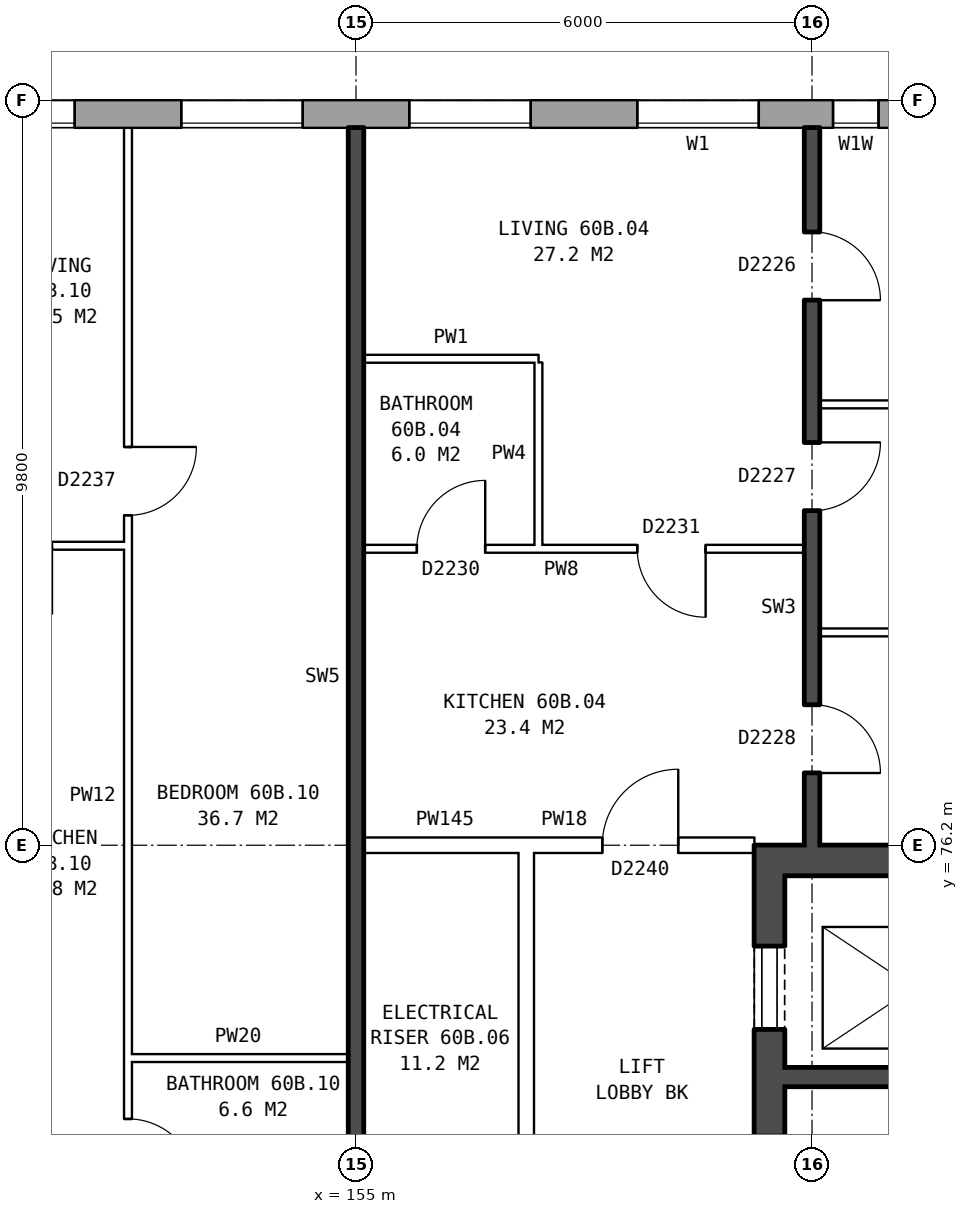
"""IFC4 building model, lengths in metres.
Left out: names, types, materials, properties, quantities, classifications, styles, units other than length and angle.
Written with IfcOpenShell. Run it as: python <this file> out.ifc"""

import sys

from ifc_helpers import new_model, si_unit, direction, frame, frame_2d, origin, place, context, subcontext, project, spatial, rectangle, extrude, element, fill, save


model = new_model("IFC4")
c1 = context("Model", 3, precision=1e-05, world=origin(), true_north=direction((0.0, 1.0)))
c2 = subcontext(c1, "Body", "Model", "MODEL_VIEW")
j1 = project(units=[si_unit("LENGTHUNIT", "METRE"), si_unit("PLANEANGLEUNIT", "RADIAN")], contexts=[c1])
p1 = place(None, origin())
s1 = spatial("IfcSite", under=j1, at=p1, CompositionType="ELEMENT")
p2 = place(p1, origin())
s2 = spatial("IfcBuilding", under=s1, at=p2, CompositionType="ELEMENT")
p3 = place(p2, frame((0.0, 0.0, 212.1)))
s3 = spatial("IfcBuildingStorey", under=s2, at=p3, CompositionType="ELEMENT", Elevation=212.1)
p4 = place(p3, frame((165.925, 85.82, 0.0), z_axis=(0.0, 0.0, 1.0), x_axis=(-1.0, 0.0, 0.0)))
e1 = element("IfcWall", 1, at=p4, inside=s3, PredefinedType="STANDARD", context=c2, shape_type="SweptSolid", body=[
    extrude(rectangle(XDim=33.875, YDim=0.36, at=frame_2d((16.938, 0.0))), origin(), (0.0, 0.0, 1.0), 2.85),
])
p5 = place(p4, frame((0.3, 0.0, 0.8)))
e2 = element("IfcOpeningElement", 2, at=p5, cuts=e1, PredefinedType="OPENING", context=c2, shape_type="SweptSolid", body=[
    extrude(rectangle(XDim=0.6, YDim=1.8, at=frame_2d((0.3, 0.9))), frame((0.0, 0.19, 0.0), z_axis=(0.0, -1.0, 0.0), x_axis=(1.0, 0.0, 0.0)), (0.0, 0.0, 1.0), 0.38),
])
p6 = place(p4, frame((5.625, 0.0, 0.8)))
e3 = element("IfcOpeningElement", 3, at=p6, cuts=e1, PredefinedType="OPENING", context=c2, shape_type="SweptSolid", body=[
    extrude(rectangle(XDim=1.6, YDim=1.8, at=frame_2d((0.8, 0.9))), frame((0.0, 0.19, 0.0), z_axis=(0.0, -1.0, 0.0), x_axis=(1.0, 0.0, 0.0)), (0.0, 0.0, 1.0), 0.38),
])
p7 = place(p4, frame((8.625, 0.0, 0.8)))
e4 = element("IfcOpeningElement", 4, at=p7, cuts=e1, PredefinedType="OPENING", context=c2, shape_type="SweptSolid", body=[
    extrude(rectangle(XDim=1.6, YDim=1.8, at=frame_2d((0.8, 0.9))), frame((0.0, 0.19, 0.0), z_axis=(0.0, -1.0, 0.0), x_axis=(1.0, 0.0, 0.0)), (0.0, 0.0, 1.0), 0.38),
])
p8 = place(p4, frame((11.625, 0.0, 0.8)))
e5 = element("IfcOpeningElement", 5, at=p8, cuts=e1, PredefinedType="OPENING", context=c2, shape_type="SweptSolid", body=[
    extrude(rectangle(XDim=1.6, YDim=1.8, at=frame_2d((0.8, 0.9))), frame((0.0, 0.19, 0.0), z_axis=(0.0, -1.0, 0.0), x_axis=(1.0, 0.0, 0.0)), (0.0, 0.0, 1.0), 0.38),
])
p9 = place(p4, frame((14.625, 0.0, 0.8)))
e6 = element("IfcOpeningElement", 6, at=p9, cuts=e1, PredefinedType="OPENING", context=c2, shape_type="SweptSolid", body=[
    extrude(rectangle(XDim=1.6, YDim=1.8, at=frame_2d((0.8, 0.9))), frame((0.0, 0.19, 0.0), z_axis=(0.0, -1.0, 0.0), x_axis=(1.0, 0.0, 0.0)), (0.0, 0.0, 1.0), 0.38),
])
p10 = place(p4, frame((17.625, 0.0, 0.8)))
e7 = element("IfcOpeningElement", 7, at=p10, cuts=e1, PredefinedType="OPENING", context=c2, shape_type="SweptSolid", body=[
    extrude(rectangle(XDim=1.6, YDim=1.8, at=frame_2d((0.8, 0.9))), frame((0.0, 0.19, 0.0), z_axis=(0.0, -1.0, 0.0), x_axis=(1.0, 0.0, 0.0)), (0.0, 0.0, 1.0), 0.38),
])
p11 = place(p4, frame((20.625, 0.0, 0.8)))
e8 = element("IfcOpeningElement", 8, at=p11, cuts=e1, PredefinedType="OPENING", context=c2, shape_type="SweptSolid", body=[
    extrude(rectangle(XDim=1.6, YDim=1.8, at=frame_2d((0.8, 0.9))), frame((0.0, 0.19, 0.0), z_axis=(0.0, -1.0, 0.0), x_axis=(1.0, 0.0, 0.0)), (0.0, 0.0, 1.0), 0.38),
])
p12 = place(p4, frame((23.625, 0.0, 0.8)))
e9 = element("IfcOpeningElement", 9, at=p12, cuts=e1, PredefinedType="OPENING", context=c2, shape_type="SweptSolid", body=[
    extrude(rectangle(XDim=1.6, YDim=1.8, at=frame_2d((0.8, 0.9))), frame((0.0, 0.19, 0.0), z_axis=(0.0, -1.0, 0.0), x_axis=(1.0, 0.0, 0.0)), (0.0, 0.0, 1.0), 0.38),
])
p13 = place(p4, frame((25.525, 0.0, 0.8)))
e10 = element("IfcOpeningElement", 10, at=p13, cuts=e1, PredefinedType="OPENING", context=c2, shape_type="SweptSolid", body=[
    extrude(rectangle(XDim=1.6, YDim=1.8, at=frame_2d((0.8, 0.9))), frame((0.0, 0.19, 0.0), z_axis=(0.0, -1.0, 0.0), x_axis=(1.0, 0.0, 0.0)), (0.0, 0.0, 1.0), 0.38),
])
p14 = place(p4, frame((29.625, 0.0, 0.8)))
e11 = element("IfcOpeningElement", 11, at=p14, cuts=e1, PredefinedType="OPENING", context=c2, shape_type="SweptSolid", body=[
    extrude(rectangle(XDim=1.6, YDim=1.8, at=frame_2d((0.8, 0.9))), frame((0.0, 0.19, 0.0), z_axis=(0.0, -1.0, 0.0), x_axis=(1.0, 0.0, 0.0)), (0.0, 0.0, 1.0), 0.38),
])
p15 = place(p4, frame((1.2, 0.0, 1.1)))
e12 = element("IfcOpeningElement", 12, at=p15, cuts=e1, PredefinedType="OPENING", context=c2, shape_type="SweptSolid", body=[
    extrude(rectangle(XDim=1.4, YDim=1.5, at=frame_2d((0.7, 0.75))), frame((0.0, 0.19, 0.0), z_axis=(0.0, -1.0, 0.0), x_axis=(1.0, 0.0, 0.0)), (0.0, 0.0, 1.0), 0.38),
])
p16 = place(p4, frame((4.05, 0.0, 0.8)))
e13 = element("IfcOpeningElement", 13, at=p16, cuts=e1, PredefinedType="OPENING", context=c2, shape_type="SweptSolid", body=[
    extrude(rectangle(XDim=0.6, YDim=0.9, at=frame_2d((0.3, 0.45))), frame((0.0, 0.19, 0.0), z_axis=(0.0, -1.0, 0.0), x_axis=(1.0, 0.0, 0.0)), (0.0, 0.0, 1.0), 0.38),
])
p17 = place(p3, frame((160.44, 76.2, 0.0), z_axis=(0.0, 0.0, 1.0), x_axis=(0.0, -1.0, 0.0)))
e14 = element("IfcWall", 14, at=p17, inside=s3, PredefinedType="SHEAR", context=c2, shape_type="SweptSolid", body=[
    extrude(rectangle(XDim=12.4, YDim=0.4, at=frame_2d((6.2, 0.0))), origin(), (0.0, 0.0, 1.0), 2.85),
])
p18 = place(p17, frame((1.325, 0.0, 0.0)))
e15 = element("IfcOpeningElement", 15, at=p18, cuts=e14, PredefinedType="OPENING", context=c2, shape_type="SweptSolid", body=[
    extrude(rectangle(XDim=1.1, YDim=2.1, at=frame_2d((0.55, 1.05))), frame((0.0, 0.21, 0.0), z_axis=(0.0, -1.0, 0.0), x_axis=(1.0, 0.0, 0.0)), (0.0, 0.0, 1.0), 0.42),
])
p19 = place(p17, frame((3.825, 0.0, 0.0)))
e16 = element("IfcOpeningElement", 16, at=p19, cuts=e14, PredefinedType="OPENING", context=c2, shape_type="SweptSolid", body=[
    extrude(rectangle(XDim=0.85, YDim=2.1, at=frame_2d((0.425, 1.05))), frame((0.0, 0.21, 0.0), z_axis=(0.0, -1.0, 0.0), x_axis=(1.0, 0.0, 0.0)), (0.0, 0.0, 1.0), 0.42),
])
p20 = place(p17, frame((5.975, 0.0, 0.0)))
e17 = element("IfcOpeningElement", 17, at=p20, cuts=e14, PredefinedType="OPENING", context=c2, shape_type="SweptSolid", body=[
    extrude(rectangle(XDim=0.85, YDim=2.1, at=frame_2d((0.425, 1.05))), frame((0.0, 0.21, 0.0), z_axis=(0.0, -1.0, 0.0), x_axis=(1.0, 0.0, 0.0)), (0.0, 0.0, 1.0), 0.42),
])
p21 = place(p17, frame((9.9, 0.0, 0.0)))
e18 = element("IfcOpeningElement", 18, at=p21, cuts=e14, PredefinedType="OPENING", context=c2, shape_type="SweptSolid", body=[
    extrude(rectangle(XDim=1.1, YDim=2.1, at=frame_2d((0.55, 1.05))), frame((0.0, 0.21, 0.0), z_axis=(0.0, -1.0, 0.0), x_axis=(1.0, 0.0, 0.0)), (0.0, 0.0, 1.0), 0.42),
])
p22 = place(p17, frame((8.125, 0.0, 0.0)))
e19 = element("IfcOpeningElement", 19, at=p22, cuts=e14, PredefinedType="OPENING", context=c2, shape_type="SweptSolid", body=[
    extrude(rectangle(XDim=0.85, YDim=2.1, at=frame_2d((0.425, 1.05))), frame((0.0, 0.21, 0.0), z_axis=(0.0, -1.0, 0.0), x_axis=(1.0, 0.0, 0.0)), (0.0, 0.0, 1.0), 0.42),
])
p23 = place(p3, frame((160.64, 76.0, 0.0), z_axis=(0.0, 0.0, 1.0), x_axis=(1.0, 0.0, 0.0)))
e20 = element("IfcWall", 20, at=p23, inside=s3, PredefinedType="SHEAR", context=c2, shape_type="SweptSolid", body=[
    extrude(rectangle(XDim=7.6, YDim=0.4, at=frame_2d((3.8, 0.0))), origin(), (0.0, 0.0, 1.0), 2.85),
])
p24 = place(p3, frame((160.64, 73.15, 0.0), z_axis=(0.0, 0.0, 1.0), x_axis=(1.0, 0.0, 0.0)))
e21 = element("IfcWall", 21, at=p24, inside=s3, PredefinedType="SHEAR", context=c2, shape_type="SweptSolid", body=[
    extrude(rectangle(XDim=4.775, YDim=0.25, at=frame_2d((2.388, 0.0))), origin(), (0.0, 0.0, 1.0), 2.85),
])
p25 = place(p3, frame((157.24, 63.9, 0.0), z_axis=(0.0, 0.0, 1.0), x_axis=(0.0, 1.0, 0.0)))
e22 = element("IfcWall", 22, at=p25, inside=s3, PredefinedType="PARTITIONING", context=c2, shape_type="SweptSolid", body=[
    extrude(rectangle(XDim=12.2, YDim=0.2, at=frame_2d((6.1, 0.0))), origin(), (0.0, 0.0, 1.0), 2.85),
])
p26 = place(p25, frame((5.1, 0.0, 0.0)))
e23 = element("IfcOpeningElement", 23, at=p26, cuts=e22, PredefinedType="OPENING", context=c2, shape_type="SweptSolid", body=[
    extrude(rectangle(XDim=2.0, YDim=2.1, at=frame_2d((1.0, 1.05))), frame((0.0, 0.11, 0.0), z_axis=(0.0, -1.0, 0.0), x_axis=(1.0, 0.0, 0.0)), (0.0, 0.0, 1.0), 0.22),
])
p27 = place(p3, frame((152.0, 73.4, 0.0), z_axis=(0.0, 0.0, 1.0), x_axis=(1.0, 0.0, 0.0)))
e24 = element("IfcWall", 24, at=p27, inside=s3, PredefinedType="PARTITIONING", context=c2, shape_type="SweptSolid", body=[
    extrude(rectangle(XDim=2.9, YDim=0.1, at=frame_2d((1.45, 0.0))), origin(), (0.0, 0.0, 1.0), 2.85),
])
p28 = place(p3, frame((155.1, 76.2, 0.0), z_axis=(0.0, 0.0, 1.0), x_axis=(1.0, 0.0, 0.0)))
e25 = element("IfcWall", 25, at=p28, inside=s3, PredefinedType="PARTITIONING", context=c2, shape_type="SweptSolid", body=[
    extrude(rectangle(XDim=2.14, YDim=0.2, at=frame_2d((1.07, 0.0))), origin(), (0.0, 0.0, 1.0), 2.85),
])
p29 = place(p3, frame((157.24, 76.2, 0.0), z_axis=(0.0, 0.0, 1.0), x_axis=(1.0, 0.0, 0.0)))
e26 = element("IfcWall", 26, at=p29, inside=s3, PredefinedType="PARTITIONING", context=c2, shape_type="SweptSolid", body=[
    extrude(rectangle(XDim=3.0, YDim=0.2, at=frame_2d((1.5, 0.0))), origin(), (0.0, 0.0, 1.0), 2.85),
])
p30 = place(p29, frame((1.0, 0.0, 0.0)))
e27 = element("IfcOpeningElement", 27, at=p30, cuts=e26, PredefinedType="OPENING", context=c2, shape_type="SweptSolid", body=[
    extrude(rectangle(XDim=1.0, YDim=2.1, at=frame_2d((0.5, 1.05))), frame((0.0, 0.11, 0.0), z_axis=(0.0, -1.0, 0.0), x_axis=(1.0, 0.0, 0.0)), (0.0, 0.0, 1.0), 0.22),
])
p31 = place(p3, frame((161.1, 79.0, 0.0), z_axis=(0.0, 0.0, 1.0), x_axis=(1.0, 0.0, 0.0)))
e28 = element("IfcWall", 28, at=p31, inside=s3, PredefinedType="PARTITIONING", context=c2, shape_type="SweptSolid", body=[
    extrude(rectangle(XDim=7.54, YDim=0.1, at=frame_2d((3.77, 0.0))), origin(), (0.0, 0.0, 1.0), 2.85),
])
p32 = place(p3, frame((155.1, 80.1, 0.0), z_axis=(0.0, 0.0, 1.0), x_axis=(1.0, 0.0, 0.0)))
e29 = element("IfcWall", 29, at=p32, inside=s3, PredefinedType="PARTITIONING", context=c2, shape_type="SweptSolid", body=[
    extrude(rectangle(XDim=5.8, YDim=0.1, at=frame_2d((2.9, 0.0))), origin(), (0.0, 0.0, 1.0), 2.85),
])
p33 = place(p32, frame((3.6, 0.0, 0.0)))
e30 = element("IfcOpeningElement", 30, at=p33, cuts=e29, PredefinedType="OPENING", context=c2, shape_type="SweptSolid", body=[
    extrude(rectangle(XDim=0.9, YDim=2.1, at=frame_2d((0.45, 1.05))), frame((0.0, 0.06, 0.0), z_axis=(0.0, -1.0, 0.0), x_axis=(1.0, 0.0, 0.0)), (0.0, 0.0, 1.0), 0.12),
])
p34 = place(p32, frame((0.7, 0.0, 0.0)))
e31 = element("IfcOpeningElement", 31, at=p34, cuts=e29, PredefinedType="OPENING", context=c2, shape_type="SweptSolid", body=[
    extrude(rectangle(XDim=0.9, YDim=2.1, at=frame_2d((0.45, 1.05))), frame((0.0, 0.06, 0.0), z_axis=(0.0, -1.0, 0.0), x_axis=(1.0, 0.0, 0.0)), (0.0, 0.0, 1.0), 0.12),
])
p35 = place(p3, frame((149.1, 80.14, 0.0), z_axis=(0.0, 0.0, 1.0), x_axis=(1.0, 0.0, 0.0)))
e32 = element("IfcWall", 32, at=p35, inside=s3, PredefinedType="PARTITIONING", context=c2, shape_type="SweptSolid", body=[
    extrude(rectangle(XDim=2.9, YDim=0.1, at=frame_2d((1.45, 0.0))), origin(), (0.0, 0.0, 1.0), 2.85),
])
p36 = place(p35, frame((1.0, 0.0, 0.0)))
e33 = element("IfcOpeningElement", 33, at=p36, cuts=e32, PredefinedType="OPENING", context=c2, shape_type="SweptSolid", body=[
    extrude(rectangle(XDim=0.9, YDim=2.1, at=frame_2d((0.45, 1.05))), frame((0.0, 0.06, 0.0), z_axis=(0.0, -1.0, 0.0), x_axis=(1.0, 0.0, 0.0)), (0.0, 0.0, 1.0), 0.12),
])
p37 = place(p3, frame((161.1, 82.0, 0.0), z_axis=(0.0, 0.0, 1.0), x_axis=(1.0, 0.0, 0.0)))
e34 = element("IfcWall", 34, at=p37, inside=s3, PredefinedType="PARTITIONING", context=c2, shape_type="SweptSolid", body=[
    extrude(rectangle(XDim=7.54, YDim=0.1, at=frame_2d((3.77, 0.0))), origin(), (0.0, 0.0, 1.0), 2.85),
])
p38 = place(p3, frame((155.1, 82.6, 0.0), z_axis=(0.0, 0.0, 1.0), x_axis=(1.0, 0.0, 0.0)))
e35 = element("IfcWall", 35, at=p38, inside=s3, PredefinedType="PARTITIONING", context=c2, shape_type="SweptSolid", body=[
    extrude(rectangle(XDim=2.3, YDim=0.1, at=frame_2d((1.15, 0.0))), origin(), (0.0, 0.0, 1.0), 2.85),
])
p39 = place(p3, frame((152.0, 71.3, 0.0), z_axis=(0.0, 0.0, 1.0), x_axis=(0.0, 1.0, 0.0)))
e36 = element("IfcWall", 36, at=p39, inside=s3, PredefinedType="PARTITIONING", context=c2, shape_type="SweptSolid", body=[
    extrude(rectangle(XDim=14.34, YDim=0.1, at=frame_2d((7.17, 0.0))), origin(), (0.0, 0.0, 1.0), 2.85),
])
p40 = place(p39, frame((9.24, 0.0, 0.0)))
e37 = element("IfcOpeningElement", 37, at=p40, cuts=e36, PredefinedType="OPENING", context=c2, shape_type="SweptSolid", body=[
    extrude(rectangle(XDim=0.9, YDim=2.1, at=frame_2d((0.45, 1.05))), frame((0.0, 0.06, 0.0), z_axis=(0.0, -1.0, 0.0), x_axis=(1.0, 0.0, 0.0)), (0.0, 0.0, 1.0), 0.12),
])
p41 = place(p39, frame((0.4, 0.0, 0.0)))
e38 = element("IfcOpeningElement", 38, at=p41, cuts=e36, PredefinedType="OPENING", context=c2, shape_type="SweptSolid", body=[
    extrude(rectangle(XDim=0.9, YDim=2.1, at=frame_2d((0.45, 1.05))), frame((0.0, 0.06, 0.0), z_axis=(0.0, -1.0, 0.0), x_axis=(1.0, 0.0, 0.0)), (0.0, 0.0, 1.0), 0.12),
])
p42 = place(p3, frame((155.0, 71.2, 0.0), z_axis=(0.0, 0.0, 1.0), x_axis=(0.0, 1.0, 0.0)))
e39 = element("IfcWall", 39, at=p42, inside=s3, PredefinedType="SOLIDWALL", context=c2, shape_type="SweptSolid", body=[
    extrude(rectangle(XDim=14.44, YDim=0.2, at=frame_2d((7.22, 0.0))), origin(), (0.0, 0.0, 1.0), 2.85),
])
p43 = place(p3, frame((157.4, 80.15, 0.0), z_axis=(0.0, 0.0, 1.0), x_axis=(0.0, 1.0, 0.0)))
e40 = element("IfcWall", 40, at=p43, inside=s3, PredefinedType="PARTITIONING", context=c2, shape_type="SweptSolid", body=[
    extrude(rectangle(XDim=2.4, YDim=0.1, at=frame_2d((1.2, 0.0))), origin(), (0.0, 0.0, 1.0), 2.85),
])
p44 = place(p3, frame((161.0, 76.2, 0.0), z_axis=(0.0, 0.0, 1.0), x_axis=(0.0, 1.0, 0.0)))
e41 = element("IfcWall", 41, at=p44, inside=s3, PredefinedType="SOLIDWALL", context=c2, shape_type="SweptSolid", body=[
    extrude(rectangle(XDim=9.44, YDim=0.2, at=frame_2d((4.72, 0.0))), origin(), (0.0, 0.0, 1.0), 2.85),
])
p45 = place(p44, frame((7.17, 0.0, 0.0)))
e42 = element("IfcOpeningElement", 42, at=p45, cuts=e41, PredefinedType="OPENING", context=c2, shape_type="SweptSolid", body=[
    extrude(rectangle(XDim=0.9, YDim=2.1, at=frame_2d((0.45, 1.05))), frame((0.0, 0.11, 0.0), z_axis=(0.0, -1.0, 0.0), x_axis=(1.0, 0.0, 0.0)), (0.0, 0.0, 1.0), 0.22),
])
p46 = place(p44, frame((4.4, 0.0, 0.0)))
e43 = element("IfcOpeningElement", 43, at=p46, cuts=e41, PredefinedType="OPENING", context=c2, shape_type="SweptSolid", body=[
    extrude(rectangle(XDim=0.9, YDim=2.1, at=frame_2d((0.45, 1.05))), frame((0.0, 0.11, 0.0), z_axis=(0.0, -1.0, 0.0), x_axis=(1.0, 0.0, 0.0)), (0.0, 0.0, 1.0), 0.22),
])
p47 = place(p44, frame((0.95, 0.0, 0.0)))
e44 = element("IfcOpeningElement", 44, at=p47, cuts=e41, PredefinedType="OPENING", context=c2, shape_type="SweptSolid", body=[
    extrude(rectangle(XDim=0.9, YDim=2.1, at=frame_2d((0.45, 1.05))), frame((0.0, 0.11, 0.0), z_axis=(0.0, -1.0, 0.0), x_axis=(1.0, 0.0, 0.0)), (0.0, 0.0, 1.0), 0.22),
])
p48 = place(p6, origin())
e45 = element("IfcWindow", 45, at=p48, inside=s3, PartitioningType="SINGLE_PANEL", PredefinedType="WINDOW", context=c2, shape_type="SweptSolid", body=[
    extrude(rectangle(XDim=1.6, YDim=1.8, at=frame_2d((0.8, 0.9))), frame((0.0, 0.15, 0.0), z_axis=(0.0, -1.0, 0.0), x_axis=(1.0, 0.0, 0.0)), (0.0, 0.0, 1.0), 0.06),
])
fill(e3, e45)
p49 = place(p7, origin())
e46 = element("IfcWindow", 46, at=p49, inside=s3, PartitioningType="SINGLE_PANEL", PredefinedType="WINDOW", context=c2, shape_type="SweptSolid", body=[
    extrude(rectangle(XDim=1.6, YDim=1.8, at=frame_2d((0.8, 0.9))), frame((0.0, 0.15, 0.0), z_axis=(0.0, -1.0, 0.0), x_axis=(1.0, 0.0, 0.0)), (0.0, 0.0, 1.0), 0.06),
])
fill(e4, e46)
p50 = place(p8, origin())
e47 = element("IfcWindow", 47, at=p50, inside=s3, PartitioningType="SINGLE_PANEL", PredefinedType="WINDOW", context=c2, shape_type="SweptSolid", body=[
    extrude(rectangle(XDim=1.6, YDim=1.8, at=frame_2d((0.8, 0.9))), frame((0.0, 0.15, 0.0), z_axis=(0.0, -1.0, 0.0), x_axis=(1.0, 0.0, 0.0)), (0.0, 0.0, 1.0), 0.06),
])
fill(e5, e47)
p51 = place(p9, origin())
e48 = element("IfcWindow", 48, at=p51, inside=s3, PartitioningType="SINGLE_PANEL", PredefinedType="WINDOW", context=c2, shape_type="SweptSolid", body=[
    extrude(rectangle(XDim=1.6, YDim=1.8, at=frame_2d((0.8, 0.9))), frame((0.0, 0.15, 0.0), z_axis=(0.0, -1.0, 0.0), x_axis=(1.0, 0.0, 0.0)), (0.0, 0.0, 1.0), 0.06),
])
fill(e6, e48)
p52 = place(p18, origin())
e49 = element("IfcDoor", 49, at=p52, inside=s3, OperationType="DOUBLE_DOOR_SLIDING", PredefinedType="DOOR", context=c2, shape_type="SweptSolid", body=[
    extrude(rectangle(XDim=1.1, YDim=2.1, at=frame_2d((0.55, 1.05))), frame((0.0, 0.185, 0.0), z_axis=(0.0, -1.0, 0.0), x_axis=(1.0, 0.0, 0.0)), (0.0, 0.0, 1.0), 0.05),
])
fill(e15, e49)
p53 = place(p45, frame((0.9, 0.0, 0.0), z_axis=(0.0, 0.0, 1.0), x_axis=(-1.0, 0.0, 0.0)))
e50 = element("IfcDoor", 50, at=p53, inside=s3, OperationType="SINGLE_SWING_RIGHT", PredefinedType="DOOR", context=c2, shape_type="SweptSolid", body=[
    extrude(rectangle(XDim=0.9, YDim=2.1, at=frame_2d((0.45, 1.05))), frame((0.0, 0.025, 0.0), z_axis=(0.0, -1.0, 0.0), x_axis=(1.0, 0.0, 0.0)), (0.0, 0.0, 1.0), 0.05),
])
fill(e42, e50)
p54 = place(p46, frame((0.9, 0.0, 0.0), z_axis=(0.0, 0.0, 1.0), x_axis=(-1.0, 0.0, 0.0)))
e51 = element("IfcDoor", 51, at=p54, inside=s3, OperationType="SINGLE_SWING_LEFT", PredefinedType="DOOR", context=c2, shape_type="SweptSolid", body=[
    extrude(rectangle(XDim=0.9, YDim=2.1, at=frame_2d((0.45, 1.05))), frame((0.0, 0.025, 0.0), z_axis=(0.0, -1.0, 0.0), x_axis=(1.0, 0.0, 0.0)), (0.0, 0.0, 1.0), 0.05),
])
fill(e43, e51)
p55 = place(p47, frame((0.9, 0.0, 0.0), z_axis=(0.0, 0.0, 1.0), x_axis=(-1.0, 0.0, 0.0)))
e52 = element("IfcDoor", 52, at=p55, inside=s3, OperationType="SINGLE_SWING_RIGHT", PredefinedType="DOOR", context=c2, shape_type="SweptSolid", body=[
    extrude(rectangle(XDim=0.9, YDim=2.1, at=frame_2d((0.45, 1.05))), frame((0.0, 0.025, 0.0), z_axis=(0.0, -1.0, 0.0), x_axis=(1.0, 0.0, 0.0)), (0.0, 0.0, 1.0), 0.05),
])
fill(e44, e52)
p56 = place(p30, origin())
e53 = element("IfcDoor", 53, at=p56, inside=s3, OperationType="SINGLE_SWING_RIGHT", PredefinedType="DOOR", context=c2, shape_type="SweptSolid", body=[
    extrude(rectangle(XDim=1.0, YDim=2.1, at=frame_2d((0.5, 1.05))), frame((0.0, 0.025, 0.0), z_axis=(0.0, -1.0, 0.0), x_axis=(1.0, 0.0, 0.0)), (0.0, 0.0, 1.0), 0.05),
])
fill(e27, e53)
p57 = place(p33, frame((0.9, 0.0, 0.0), z_axis=(0.0, 0.0, 1.0), x_axis=(-1.0, 0.0, 0.0)))
e54 = element("IfcDoor", 54, at=p57, inside=s3, OperationType="SINGLE_SWING_LEFT", PredefinedType="DOOR", context=c2, shape_type="SweptSolid", body=[
    extrude(rectangle(XDim=0.9, YDim=2.1, at=frame_2d((0.45, 1.05))), frame((0.0, 0.025, 0.0), z_axis=(0.0, -1.0, 0.0), x_axis=(1.0, 0.0, 0.0)), (0.0, 0.0, 1.0), 0.05),
])
fill(e30, e54)
p58 = place(p34, origin())
e55 = element("IfcDoor", 55, at=p58, inside=s3, OperationType="SINGLE_SWING_RIGHT", PredefinedType="DOOR", context=c2, shape_type="SweptSolid", body=[
    extrude(rectangle(XDim=0.9, YDim=2.1, at=frame_2d((0.45, 1.05))), frame((0.0, 0.025, 0.0), z_axis=(0.0, -1.0, 0.0), x_axis=(1.0, 0.0, 0.0)), (0.0, 0.0, 1.0), 0.05),
])
fill(e31, e55)
p59 = place(p40, frame((0.9, 0.0, 0.0), z_axis=(0.0, 0.0, 1.0), x_axis=(-1.0, 0.0, 0.0)))
e56 = element("IfcDoor", 56, at=p59, inside=s3, OperationType="SINGLE_SWING_LEFT", PredefinedType="DOOR", context=c2, shape_type="SweptSolid", body=[
    extrude(rectangle(XDim=0.9, YDim=2.1, at=frame_2d((0.45, 1.05))), frame((0.0, 0.025, 0.0), z_axis=(0.0, -1.0, 0.0), x_axis=(1.0, 0.0, 0.0)), (0.0, 0.0, 1.0), 0.05),
])
fill(e37, e56)
p60 = place(p41, frame((0.9, 0.0, 0.0), z_axis=(0.0, 0.0, 1.0), x_axis=(-1.0, 0.0, 0.0)))
e57 = element("IfcDoor", 57, at=p60, inside=s3, OperationType="SINGLE_SWING_RIGHT", PredefinedType="DOOR", context=c2, shape_type="SweptSolid", body=[
    extrude(rectangle(XDim=0.9, YDim=2.1, at=frame_2d((0.45, 1.05))), frame((0.0, 0.025, 0.0), z_axis=(0.0, -1.0, 0.0), x_axis=(1.0, 0.0, 0.0)), (0.0, 0.0, 1.0), 0.05),
])
fill(e38, e57)
p61 = place(p16, origin())
e58 = element("IfcWindow", 58, at=p61, inside=s3, PartitioningType="SINGLE_PANEL", PredefinedType="WINDOW", context=c2, shape_type="SweptSolid", body=[
    extrude(rectangle(XDim=0.6, YDim=0.9, at=frame_2d((0.3, 0.45))), frame((0.0, 0.15, 0.0), z_axis=(0.0, -1.0, 0.0), x_axis=(1.0, 0.0, 0.0)), (0.0, 0.0, 1.0), 0.06),
])
fill(e13, e58)
save(model, sys.argv[1])
